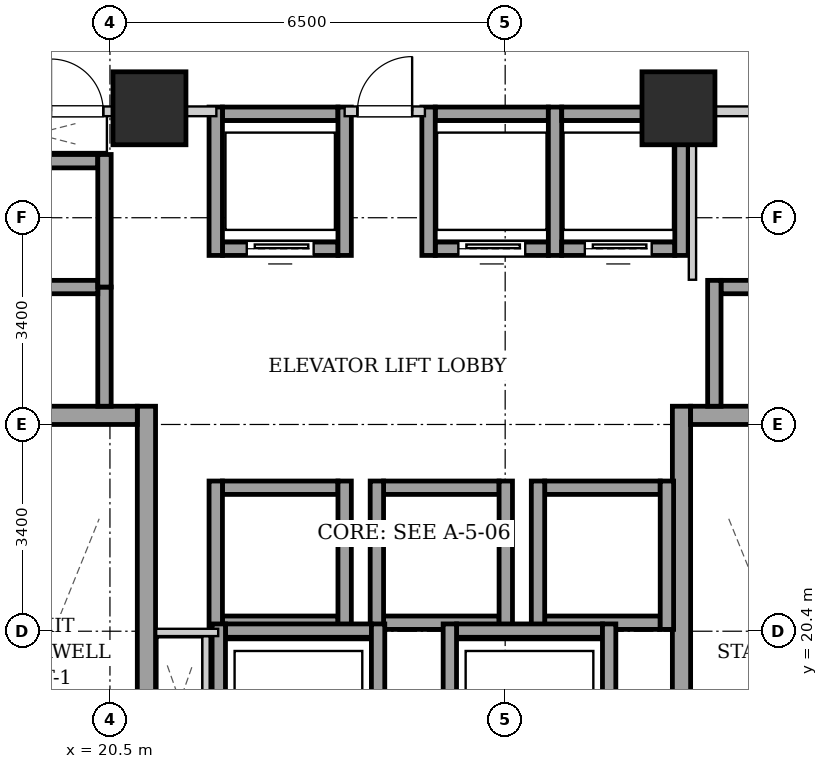
"""IFC4 building model, lengths in metres.
Left out: names, types, materials, properties, quantities, classifications, styles, units other than length and angle.
Written with IfcOpenShell. Run it as: python <this file> out.ifc"""

import sys

from ifc_helpers import new_model, si_unit, direction, frame, frame_2d, origin, origin_2d, place, context, subcontext, project, spatial, rectangle, extrude, element, fill, save


model = new_model("IFC4")
c1 = context("Model", 3, precision=1e-05, world=origin(), true_north=direction((0.0, 1.0)))
c2 = subcontext(c1, "Body", "Model", "MODEL_VIEW")
j1 = project(units=[si_unit("LENGTHUNIT", "METRE"), si_unit("PLANEANGLEUNIT", "RADIAN")], contexts=[c1])
p1 = place(None, origin())
s1 = spatial("IfcSite", under=j1, at=p1, CompositionType="ELEMENT")
p2 = place(p1, origin())
s2 = spatial("IfcBuilding", under=s1, at=p2, CompositionType="ELEMENT")
p3 = place(p2, frame((0.0, 0.0, 67.4)))
s3 = spatial("IfcBuildingStorey", under=s2, at=p3, CompositionType="ELEMENT", Elevation=67.4)
for number, where, z_axis, x_axis in (
    (1, (21.15, 29.0, 0.0), (0.0, 0.0, 1.0), (1.0, 0.0, 0.0)),
    (2, (29.85, 29.0, 0.0), (0.0, 0.0, 1.0), (1.0, 0.0, 0.0)),
):
    element("IfcColumn", number, at=place(p3, frame(where, z_axis=z_axis, x_axis=x_axis)), inside=s3, PredefinedType="COLUMN", context=c2, shape_type="SweptSolid", body=[
        extrude(rectangle(XDim=1.2, YDim=1.2, at=origin_2d()), origin(), (0.0, 0.0, 1.0), 3.2),
    ])
p4 = place(p3, frame((21.1, 15.1, 0.0), z_axis=(0.0, 0.0, 1.0), x_axis=(0.0, 1.0, 0.0)))
e3 = element("IfcWall", 3, at=p4, inside=s3, PredefinedType="SHEAR", context=c2, shape_type="SweptSolid", body=[
    extrude(rectangle(XDim=9.0, YDim=0.3, at=frame_2d((4.5, 0.0))), origin(), (0.0, 0.0, 1.0), 2.88),
])
p5 = place(p3, frame((18.1, 23.95, 0.0), z_axis=(0.0, 0.0, 1.0), x_axis=(1.0, 0.0, 0.0)))
e4 = element("IfcWall", 4, at=p5, inside=s3, PredefinedType="SHEAR", context=c2, shape_type="SweptSolid", body=[
    extrude(rectangle(XDim=2.85, YDim=0.3, at=frame_2d((1.425, 0.0))), origin(), (0.0, 0.0, 1.0), 2.88),
])
p6 = place(p3, frame((29.9, 15.1, 0.0), z_axis=(0.0, 0.0, 1.0), x_axis=(0.0, 1.0, 0.0)))
e5 = element("IfcWall", 5, at=p6, inside=s3, PredefinedType="SHEAR", context=c2, shape_type="SweptSolid", body=[
    extrude(rectangle(XDim=9.0, YDim=0.3, at=frame_2d((4.5, 0.0))), origin(), (0.0, 0.0, 1.0), 2.88),
])
p7 = place(p3, frame((30.05, 23.95, 0.0), z_axis=(0.0, 0.0, 1.0), x_axis=(1.0, 0.0, 0.0)))
e6 = element("IfcWall", 6, at=p7, inside=s3, PredefinedType="SHEAR", context=c2, shape_type="SweptSolid", body=[
    extrude(rectangle(XDim=2.85, YDim=0.3, at=frame_2d((1.425, 0.0))), origin(), (0.0, 0.0, 1.0), 2.88),
])
p8 = place(p3, frame((22.35, 26.69, 0.0), z_axis=(0.0, 0.0, 1.0), x_axis=(1.0, 0.0, 0.0)))
e7 = element("IfcWall", 7, at=p8, inside=s3, PredefinedType="SHEAR", context=c2, shape_type="SweptSolid", body=[
    extrude(rectangle(XDim=1.9, YDim=0.22, at=frame_2d((0.95, 0.0))), origin(), (0.0, 0.0, 1.0), 2.88),
])
p9 = place(p8, frame((0.4, 0.0, 0.0)))
e8 = element("IfcOpeningElement", 8, at=p9, cuts=e7, PredefinedType="OPENING", context=c2, shape_type="SweptSolid", body=[
    extrude(rectangle(XDim=1.1, YDim=2.15, at=frame_2d((0.55, 1.075))), frame((0.0, 0.12, 0.0), z_axis=(0.0, -1.0, 0.0), x_axis=(1.0, 0.0, 0.0)), (0.0, 0.0, 1.0), 0.24),
])
p10 = place(p3, frame((22.35, 28.91, 0.0), z_axis=(0.0, 0.0, 1.0), x_axis=(1.0, 0.0, 0.0)))
e9 = element("IfcWall", 9, at=p10, inside=s3, PredefinedType="SHEAR", context=c2, shape_type="SweptSolid", body=[
    extrude(rectangle(XDim=1.9, YDim=0.22, at=frame_2d((0.95, 0.0))), origin(), (0.0, 0.0, 1.0), 2.88),
])
for number, where, z_axis, x_axis in (
    (10, (22.24, 26.58, 0.0), (0.0, 0.0, 1.0), (0.0, 1.0, 0.0)),
    (11, (24.36, 26.58, 0.0), (0.0, 0.0, 1.0), (0.0, 1.0, 0.0)),
):
    element("IfcWall", number, at=place(p3, frame(where, z_axis=z_axis, x_axis=x_axis)), inside=s3, PredefinedType="SHEAR", context=c2, shape_type="SweptSolid", body=[
        extrude(rectangle(XDim=2.44, YDim=0.22, at=frame_2d((1.22, 0.0))), origin(), (0.0, 0.0, 1.0), 2.88),
    ])
p11 = place(p3, frame((25.85, 26.69, 0.0), z_axis=(0.0, 0.0, 1.0), x_axis=(1.0, 0.0, 0.0)))
e12 = element("IfcWall", 12, at=p11, inside=s3, PredefinedType="SHEAR", context=c2, shape_type="SweptSolid", body=[
    extrude(rectangle(XDim=1.86, YDim=0.22, at=frame_2d((0.93, 0.0))), origin(), (0.0, 0.0, 1.0), 2.88),
])
p12 = place(p11, frame((0.38, 0.0, 0.0)))
e13 = element("IfcOpeningElement", 13, at=p12, cuts=e12, PredefinedType="OPENING", context=c2, shape_type="SweptSolid", body=[
    extrude(rectangle(XDim=1.1, YDim=2.15, at=frame_2d((0.55, 1.075))), frame((0.0, 0.12, 0.0), z_axis=(0.0, -1.0, 0.0), x_axis=(1.0, 0.0, 0.0)), (0.0, 0.0, 1.0), 0.24),
])
p13 = place(p3, frame((25.85, 28.91, 0.0), z_axis=(0.0, 0.0, 1.0), x_axis=(1.0, 0.0, 0.0)))
e14 = element("IfcWall", 14, at=p13, inside=s3, PredefinedType="SHEAR", context=c2, shape_type="SweptSolid", body=[
    extrude(rectangle(XDim=1.86, YDim=0.22, at=frame_2d((0.93, 0.0))), origin(), (0.0, 0.0, 1.0), 2.88),
])
for number, where, z_axis, x_axis in (
    (15, (25.74, 26.58, 0.0), (0.0, 0.0, 1.0), (0.0, 1.0, 0.0)),
    (16, (27.82, 26.58, 0.0), (0.0, 0.0, 1.0), (0.0, 1.0, 0.0)),
):
    element("IfcWall", number, at=place(p3, frame(where, z_axis=z_axis, x_axis=x_axis)), inside=s3, PredefinedType="SHEAR", context=c2, shape_type="SweptSolid", body=[
        extrude(rectangle(XDim=2.44, YDim=0.22, at=frame_2d((1.22, 0.0))), origin(), (0.0, 0.0, 1.0), 2.88),
    ])
p14 = place(p3, frame((27.93, 26.69, 0.0), z_axis=(0.0, 0.0, 1.0), x_axis=(1.0, 0.0, 0.0)))
e17 = element("IfcWall", 17, at=p14, inside=s3, PredefinedType="SHEAR", context=c2, shape_type="SweptSolid", body=[
    extrude(rectangle(XDim=1.86, YDim=0.22, at=frame_2d((0.93, 0.0))), origin(), (0.0, 0.0, 1.0), 2.88),
])
p15 = place(p14, frame((0.38, 0.0, 0.0)))
e18 = element("IfcOpeningElement", 18, at=p15, cuts=e17, PredefinedType="OPENING", context=c2, shape_type="SweptSolid", body=[
    extrude(rectangle(XDim=1.1, YDim=2.15, at=frame_2d((0.55, 1.075))), frame((0.0, 0.12, 0.0), z_axis=(0.0, -1.0, 0.0), x_axis=(1.0, 0.0, 0.0)), (0.0, 0.0, 1.0), 0.24),
])
p16 = place(p3, frame((27.93, 28.91, 0.0), z_axis=(0.0, 0.0, 1.0), x_axis=(1.0, 0.0, 0.0)))
e19 = element("IfcWall", 19, at=p16, inside=s3, PredefinedType="SHEAR", context=c2, shape_type="SweptSolid", body=[
    extrude(rectangle(XDim=1.86, YDim=0.22, at=frame_2d((0.93, 0.0))), origin(), (0.0, 0.0, 1.0), 2.88),
])
p17 = place(p3, frame((29.9, 26.58, 0.0), z_axis=(0.0, 0.0, 1.0), x_axis=(0.0, 1.0, 0.0)))
e20 = element("IfcWall", 20, at=p17, inside=s3, PredefinedType="SHEAR", context=c2, shape_type="SweptSolid", body=[
    extrude(rectangle(XDim=2.44, YDim=0.22, at=frame_2d((1.22, 0.0))), origin(), (0.0, 0.0, 1.0), 2.88),
])
for number, where, z_axis, x_axis in (
    (21, (22.35, 20.54, 0.0), (0.0, 0.0, 1.0), (1.0, 0.0, 0.0)),
    (22, (22.35, 22.76, 0.0), (0.0, 0.0, 1.0), (1.0, 0.0, 0.0)),
):
    element("IfcWall", number, at=place(p3, frame(where, z_axis=z_axis, x_axis=x_axis)), inside=s3, PredefinedType="SHEAR", context=c2, shape_type="SweptSolid", body=[
        extrude(rectangle(XDim=1.9, YDim=0.22, at=frame_2d((0.95, 0.0))), origin(), (0.0, 0.0, 1.0), 2.88),
    ])
for number, where, z_axis, x_axis in (
    (23, (22.24, 20.43, 0.0), (0.0, 0.0, 1.0), (0.0, 1.0, 0.0)),
    (24, (24.36, 20.43, 0.0), (0.0, 0.0, 1.0), (0.0, 1.0, 0.0)),
):
    element("IfcWall", number, at=place(p3, frame(where, z_axis=z_axis, x_axis=x_axis)), inside=s3, PredefinedType="SHEAR", context=c2, shape_type="SweptSolid", body=[
        extrude(rectangle(XDim=2.44, YDim=0.22, at=frame_2d((1.22, 0.0))), origin(), (0.0, 0.0, 1.0), 2.88),
    ])
for number, where, z_axis, x_axis in (
    (25, (25.0, 20.54, 0.0), (0.0, 0.0, 1.0), (1.0, 0.0, 0.0)),
    (26, (25.0, 22.76, 0.0), (0.0, 0.0, 1.0), (1.0, 0.0, 0.0)),
):
    element("IfcWall", number, at=place(p3, frame(where, z_axis=z_axis, x_axis=x_axis)), inside=s3, PredefinedType="SHEAR", context=c2, shape_type="SweptSolid", body=[
        extrude(rectangle(XDim=1.9, YDim=0.22, at=frame_2d((0.95, 0.0))), origin(), (0.0, 0.0, 1.0), 2.88),
    ])
for number, where, z_axis, x_axis in (
    (27, (24.89, 20.43, 0.0), (0.0, 0.0, 1.0), (0.0, 1.0, 0.0)),
    (28, (27.01, 20.43, 0.0), (0.0, 0.0, 1.0), (0.0, 1.0, 0.0)),
):
    element("IfcWall", number, at=place(p3, frame(where, z_axis=z_axis, x_axis=x_axis)), inside=s3, PredefinedType="SHEAR", context=c2, shape_type="SweptSolid", body=[
        extrude(rectangle(XDim=2.44, YDim=0.22, at=frame_2d((1.22, 0.0))), origin(), (0.0, 0.0, 1.0), 2.88),
    ])
for number, where, z_axis, x_axis in (
    (29, (27.65, 20.54, 0.0), (0.0, 0.0, 1.0), (1.0, 0.0, 0.0)),
    (30, (27.65, 22.76, 0.0), (0.0, 0.0, 1.0), (1.0, 0.0, 0.0)),
):
    element("IfcWall", number, at=place(p3, frame(where, z_axis=z_axis, x_axis=x_axis)), inside=s3, PredefinedType="SHEAR", context=c2, shape_type="SweptSolid", body=[
        extrude(rectangle(XDim=1.9, YDim=0.22, at=frame_2d((0.95, 0.0))), origin(), (0.0, 0.0, 1.0), 2.88),
    ])
for number, where, z_axis, x_axis in (
    (31, (27.54, 20.43, 0.0), (0.0, 0.0, 1.0), (0.0, 1.0, 0.0)),
    (32, (29.66, 20.43, 0.0), (0.0, 0.0, 1.0), (0.0, 1.0, 0.0)),
):
    element("IfcWall", number, at=place(p3, frame(where, z_axis=z_axis, x_axis=x_axis)), inside=s3, PredefinedType="SHEAR", context=c2, shape_type="SweptSolid", body=[
        extrude(rectangle(XDim=2.44, YDim=0.22, at=frame_2d((1.22, 0.0))), origin(), (0.0, 0.0, 1.0), 2.88),
    ])
p18 = place(p3, frame((20.41, 24.1, 0.0), z_axis=(0.0, 0.0, 1.0), x_axis=(0.0, 1.0, 0.0)))
e33 = element("IfcWall", 33, at=p18, inside=s3, PredefinedType="SHEAR", context=c2, shape_type="SweptSolid", body=[
    extrude(rectangle(XDim=1.96, YDim=0.22, at=frame_2d((0.98, 0.0))), origin(), (0.0, 0.0, 1.0), 2.88),
])
for number, where, z_axis, x_axis in (
    (34, (18.4, 26.06, 0.0), (0.0, 0.0, 1.0), (1.0, 0.0, 0.0)),
    (35, (18.4, 28.13, 0.0), (0.0, 0.0, 1.0), (1.0, 0.0, 0.0)),
):
    element("IfcWall", number, at=place(p3, frame(where, z_axis=z_axis, x_axis=x_axis)), inside=s3, PredefinedType="SHEAR", context=c2, shape_type="SweptSolid", body=[
        extrude(rectangle(XDim=1.9, YDim=0.22, at=frame_2d((0.95, 0.0))), origin(), (0.0, 0.0, 1.0), 2.88),
    ])
p19 = place(p3, frame((20.41, 26.06, 0.0), z_axis=(0.0, 0.0, 1.0), x_axis=(0.0, 1.0, 0.0)))
e36 = element("IfcWall", 36, at=p19, inside=s3, PredefinedType="SHEAR", context=c2, shape_type="SweptSolid", body=[
    extrude(rectangle(XDim=2.18, YDim=0.22, at=frame_2d((1.09, 0.0))), origin(), (0.0, 0.0, 1.0), 2.88),
])
p20 = place(p3, frame((30.55, 26.06, 0.0), z_axis=(0.0, 0.0, 1.0), x_axis=(1.0, 0.0, 0.0)))
e37 = element("IfcWall", 37, at=p20, inside=s3, PredefinedType="SHEAR", context=c2, shape_type="SweptSolid", body=[
    extrude(rectangle(XDim=1.9, YDim=0.22, at=frame_2d((0.95, 0.0))), origin(), (0.0, 0.0, 1.0), 2.88),
])
p21 = place(p3, frame((30.44, 24.1, 0.0), z_axis=(0.0, 0.0, 1.0), x_axis=(0.0, 1.0, 0.0)))
e38 = element("IfcWall", 38, at=p21, inside=s3, PredefinedType="SHEAR", context=c2, shape_type="SweptSolid", body=[
    extrude(rectangle(XDim=2.07, YDim=0.22, at=frame_2d((1.035, 0.0))), origin(), (0.0, 0.0, 1.0), 2.88),
])
p22 = place(p3, frame((22.4, 20.41, 0.0), z_axis=(0.0, 0.0, 1.0), x_axis=(1.0, 0.0, 0.0)))
e39 = element("IfcWall", 39, at=p22, inside=s3, PredefinedType="SHEAR", context=c2, shape_type="SweptSolid", body=[
    extrude(rectangle(XDim=2.4, YDim=0.22, at=frame_2d((1.2, 0.0))), origin(), (0.0, 0.0, 1.0), 2.88),
])
for number, where, z_axis, x_axis in (
    (40, (22.29, 17.98, 0.0), (0.0, 0.0, 1.0), (0.0, 1.0, 0.0)),
    (41, (24.91, 17.98, 0.0), (0.0, 0.0, 1.0), (0.0, 1.0, 0.0)),
):
    element("IfcWall", number, at=place(p3, frame(where, z_axis=z_axis, x_axis=x_axis)), inside=s3, PredefinedType="SHEAR", context=c2, shape_type="SweptSolid", body=[
        extrude(rectangle(XDim=2.54, YDim=0.22, at=frame_2d((1.27, 0.0))), origin(), (0.0, 0.0, 1.0), 2.88),
    ])
p23 = place(p3, frame((26.2, 20.41, 0.0), z_axis=(0.0, 0.0, 1.0), x_axis=(1.0, 0.0, 0.0)))
e42 = element("IfcWall", 42, at=p23, inside=s3, PredefinedType="SHEAR", context=c2, shape_type="SweptSolid", body=[
    extrude(rectangle(XDim=2.4, YDim=0.22, at=frame_2d((1.2, 0.0))), origin(), (0.0, 0.0, 1.0), 2.88),
])
for number, where, z_axis, x_axis in (
    (43, (26.09, 17.98, 0.0), (0.0, 0.0, 1.0), (0.0, 1.0, 0.0)),
    (44, (28.71, 17.98, 0.0), (0.0, 0.0, 1.0), (0.0, 1.0, 0.0)),
):
    element("IfcWall", number, at=place(p3, frame(where, z_axis=z_axis, x_axis=x_axis)), inside=s3, PredefinedType="SHEAR", context=c2, shape_type="SweptSolid", body=[
        extrude(rectangle(XDim=2.54, YDim=0.22, at=frame_2d((1.27, 0.0))), origin(), (0.0, 0.0, 1.0), 2.88),
    ])
p24 = place(p3, frame((24.36, 28.95, 0.0), z_axis=(0.0, 0.0, 1.0), x_axis=(1.0, 0.0, 0.0)))
e45 = element("IfcWall", 45, at=p24, inside=s3, PredefinedType="PARTITIONING", context=c2, shape_type="SweptSolid", body=[
    extrude(rectangle(XDim=1.32, YDim=0.16, at=frame_2d((0.66, 0.0))), origin(), (0.0, 0.0, 1.0), 2.172),
])
p25 = place(p24, frame((0.21, 0.0, 0.0)))
e46 = element("IfcOpeningElement", 46, at=p25, cuts=e45, PredefinedType="OPENING", context=c2, shape_type="SweptSolid", body=[
    extrude(rectangle(XDim=0.9, YDim=2.05, at=frame_2d((0.45, 1.025))), frame((0.0, 0.09, 0.0), z_axis=(0.0, -1.0, 0.0), x_axis=(1.0, 0.0, 0.0)), (0.0, 0.0, 1.0), 0.18),
])
p26 = place(p3, frame((17.96, 28.95, 0.0), z_axis=(0.0, 0.0, 1.0), x_axis=(1.0, 0.0, 0.0)))
e47 = element("IfcWall", 47, at=p26, inside=s3, PredefinedType="PARTITIONING", context=c2, shape_type="SweptSolid", body=[
    extrude(rectangle(XDim=4.29, YDim=0.16, at=frame_2d((2.145, 0.0))), origin(), (0.0, 0.0, 1.0), 2.172),
])
p27 = place(p26, frame((1.57, 0.0, 0.0)))
e48 = element("IfcOpeningElement", 48, at=p27, cuts=e47, PredefinedType="OPENING", context=c2, shape_type="SweptSolid", body=[
    extrude(rectangle(XDim=0.86, YDim=2.05, at=frame_2d((0.43, 1.025))), frame((0.0, 0.09, 0.0), z_axis=(0.0, -1.0, 0.0), x_axis=(1.0, 0.0, 0.0)), (0.0, 0.0, 1.0), 0.18),
])
p28 = place(p3, frame((22.08, 18.2, 0.0), z_axis=(0.0, 0.0, 1.0), x_axis=(0.0, 1.0, 0.0)))
e49 = element("IfcWall", 49, at=p28, inside=s3, PredefinedType="PARTITIONING", context=c2, shape_type="SweptSolid", body=[
    extrude(rectangle(XDim=2.12, YDim=0.12, at=frame_2d((1.06, 0.0))), origin(), (0.0, 0.0, 1.0), 2.88),
])
p29 = place(p3, frame((22.28, 20.38, 0.0), z_axis=(0.0, 0.0, 1.0), x_axis=(-1.0, 0.0, 0.0)))
e50 = element("IfcWall", 50, at=p29, inside=s3, PredefinedType="PARTITIONING", context=c2, shape_type="SweptSolid", body=[
    extrude(rectangle(XDim=1.02, YDim=0.12, at=frame_2d((0.51, 0.0))), origin(), (0.0, 0.0, 1.0), 2.88),
])
p30 = place(p3, frame((30.08, 26.18, 0.0), z_axis=(0.0, 0.0, 1.0), x_axis=(0.0, 1.0, 0.0)))
e51 = element("IfcWall", 51, at=p30, inside=s3, PredefinedType="PARTITIONING", context=c2, shape_type="SweptSolid", body=[
    extrude(rectangle(XDim=2.68, YDim=0.12, at=frame_2d((1.34, 0.0))), origin(), (0.0, 0.0, 1.0), 2.88),
])
p31 = place(p3, frame((30.08, 28.95, 0.0), z_axis=(0.0, 0.0, 1.0), x_axis=(1.0, 0.0, 0.0)))
e52 = element("IfcWall", 52, at=p31, inside=s3, PredefinedType="PARTITIONING", context=c2, shape_type="SweptSolid", body=[
    extrude(rectangle(XDim=2.96, YDim=0.16, at=frame_2d((1.48, 0.0))), origin(), (0.0, 0.0, 1.0), 2.88),
])
p32 = place(p31, frame((1.045, 0.0, 0.0)))
e53 = element("IfcOpeningElement", 53, at=p32, cuts=e52, PredefinedType="OPENING", context=c2, shape_type="SweptSolid", body=[
    extrude(rectangle(XDim=0.86, YDim=2.05, at=frame_2d((0.43, 1.025))), frame((0.0, 0.09, 0.0), z_axis=(0.0, -1.0, 0.0), x_axis=(1.0, 0.0, 0.0)), (0.0, 0.0, 1.0), 0.18),
])
p33 = place(p9, origin())
e54 = element("IfcDoor", 54, at=p33, inside=s3, OperationType="SLIDING_TO_LEFT", PredefinedType="DOOR", context=c2, shape_type="SweptSolid", body=[
    extrude(rectangle(XDim=1.1, YDim=2.15, at=frame_2d((0.55, 1.075))), frame((0.0, 0.025, 0.0), z_axis=(0.0, -1.0, 0.0), x_axis=(1.0, 0.0, 0.0)), (0.0, 0.0, 1.0), 0.05),
])
fill(e8, e54)
p34 = place(p12, origin())
e55 = element("IfcDoor", 55, at=p34, inside=s3, OperationType="SLIDING_TO_LEFT", PredefinedType="DOOR", context=c2, shape_type="SweptSolid", body=[
    extrude(rectangle(XDim=1.1, YDim=2.15, at=frame_2d((0.55, 1.075))), frame((0.0, 0.025, 0.0), z_axis=(0.0, -1.0, 0.0), x_axis=(1.0, 0.0, 0.0)), (0.0, 0.0, 1.0), 0.05),
])
fill(e13, e55)
p35 = place(p15, origin())
e56 = element("IfcDoor", 56, at=p35, inside=s3, OperationType="SLIDING_TO_LEFT", PredefinedType="DOOR", context=c2, shape_type="SweptSolid", body=[
    extrude(rectangle(XDim=1.1, YDim=2.15, at=frame_2d((0.55, 1.075))), frame((0.0, 0.025, 0.0), z_axis=(0.0, -1.0, 0.0), x_axis=(1.0, 0.0, 0.0)), (0.0, 0.0, 1.0), 0.05),
])
fill(e18, e56)
p36 = place(p25, origin())
e57 = element("IfcDoor", 57, at=p36, inside=s3, OperationType="SINGLE_SWING_RIGHT", PredefinedType="DOOR", context=c2, shape_type="SweptSolid", body=[
    extrude(rectangle(XDim=0.9, YDim=2.05, at=frame_2d((0.45, 1.025))), frame((0.0, 0.025, 0.0), z_axis=(0.0, -1.0, 0.0), x_axis=(1.0, 0.0, 0.0)), (0.0, 0.0, 1.0), 0.05),
])
fill(e46, e57)
p37 = place(p27, origin())
e58 = element("IfcDoor", 58, at=p37, inside=s3, OperationType="SINGLE_SWING_LEFT", PredefinedType="DOOR", context=c2, shape_type="SweptSolid", body=[
    extrude(rectangle(XDim=0.86, YDim=2.05, at=frame_2d((0.43, 1.025))), frame((0.0, 0.025, 0.0), z_axis=(0.0, -1.0, 0.0), x_axis=(1.0, 0.0, 0.0)), (0.0, 0.0, 1.0), 0.05),
])
fill(e48, e58)
save(model, sys.argv[1])
